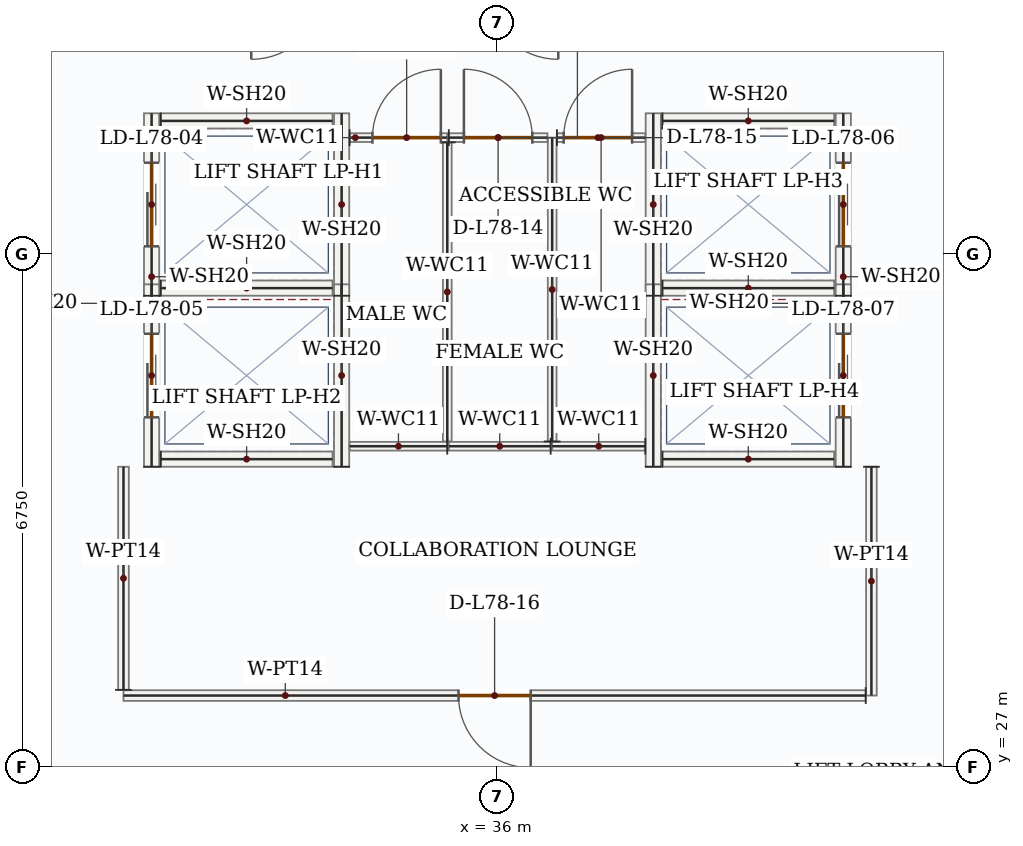
"""IFC4 building model, lengths in metres.
Left out: names, types, materials, properties, quantities, classifications, styles, units other than length and angle.
Written with IfcOpenShell. Run it as: python <this file> out.ifc"""

import sys

from ifc_helpers import new_model, si_unit, direction, frame, frame_2d, origin, place, context, subcontext, project, spatial, rectangle, extrude, source, transform, mapped, element, fill, save


model = new_model("IFC4")
c1 = context("Model", 3, precision=1e-05, world=origin(), true_north=direction((0.0, 1.0)))
c2 = subcontext(c1, "Body", "Model", "MODEL_VIEW")
j1 = project(units=[si_unit("LENGTHUNIT", "METRE"), si_unit("PLANEANGLEUNIT", "RADIAN")], contexts=[c1])
p1 = place(None, origin())
s1 = spatial("IfcSite", under=j1, at=p1, CompositionType="ELEMENT")
p2 = place(p1, origin())
s2 = spatial("IfcBuilding", under=s1, at=p2, CompositionType="ELEMENT")
p3 = place(p2, frame((0.0, 0.0, 323.55)))
s3 = spatial("IfcBuildingStorey", under=s2, at=p3, CompositionType="ELEMENT", Elevation=323.55)
p4 = place(p3, frame((31.45, 33.2, 0.0), z_axis=(0.0, 0.0, 1.0), x_axis=(0.0, 1.0, 0.0)))
e1 = element("IfcWall", 1, at=p4, inside=s3, PredefinedType="SOLIDWALL", context=c2, shape_type="SweptSolid", body=[
    extrude(rectangle(XDim=2.4, YDim=0.2, at=frame_2d((1.2, 0.0))), origin(), (0.0, 0.0, 1.0), 3.5),
])
p5 = place(p4, frame((0.65, 0.0, 0.0)))
e2 = element("IfcOpeningElement", 2, at=p5, cuts=e1, PredefinedType="OPENING", context=c2, shape_type="SweptSolid", body=[
    extrude(rectangle(XDim=1.1, YDim=2.15, at=frame_2d((0.55, 1.075))), frame((0.0, 0.11, 0.0), z_axis=(0.0, -1.0, 0.0), x_axis=(1.0, 0.0, 0.0)), (0.0, 0.0, 1.0), 0.22),
])
m1 = source(origin(), c2, "Body", "SweptSolid", [
    extrude(rectangle(XDim=2.4, YDim=0.2, at=frame_2d((1.2, 0.0))), origin(), (0.0, 0.0, 1.0), 3.5),
])
p6 = place(p3, frame((33.95, 33.2, 0.0), z_axis=(0.0, 0.0, 1.0), x_axis=(0.0, 1.0, 0.0)))
e3 = element("IfcWall", 3, at=p6, inside=s3, PredefinedType="SOLIDWALL", context=c2, shape_type="MappedRepresentation", body=[
    mapped(m1, transform((0.0, 0.0, 0.0), x_axis=(1.0, 0.0, 0.0), y_axis=(0.0, 1.0, 0.0), z_axis=(0.0, 0.0, 1.0), scale=1.0)),
])
m2 = source(origin(), c2, "Body", "SweptSolid", [
    extrude(rectangle(XDim=2.26, YDim=0.2, at=frame_2d((1.13, 0.0))), origin(), (0.0, 0.0, 1.0), 3.5),
])
for number, where, z_axis, x_axis in (
    (4, (31.57, 33.3, 0.0), (0.0, 0.0, 1.0), (1.0, 0.0, 0.0)),
    (5, (31.57, 35.5, 0.0), (0.0, 0.0, 1.0), (1.0, 0.0, 0.0)),
):
    element("IfcWall", number, at=place(p3, frame(where, z_axis=z_axis, x_axis=x_axis)), inside=s3, PredefinedType="SOLIDWALL", context=c2, shape_type="MappedRepresentation", body=[
        mapped(m2, transform((0.0, 0.0, 0.0), x_axis=(1.0, 0.0, 0.0), y_axis=(0.0, 1.0, 0.0), z_axis=(0.0, 0.0, 1.0), scale=1.0)),
    ])
p7 = place(p3, frame((31.45, 30.95, 0.0), z_axis=(0.0, 0.0, 1.0), x_axis=(0.0, 1.0, 0.0)))
e6 = element("IfcWall", 6, at=p7, inside=s3, PredefinedType="SOLIDWALL", context=c2, shape_type="SweptSolid", body=[
    extrude(rectangle(XDim=2.4, YDim=0.2, at=frame_2d((1.2, 0.0))), origin(), (0.0, 0.0, 1.0), 3.5),
])
p8 = place(p7, frame((0.65, 0.0, 0.0)))
e7 = element("IfcOpeningElement", 7, at=p8, cuts=e6, PredefinedType="OPENING", context=c2, shape_type="SweptSolid", body=[
    extrude(rectangle(XDim=1.1, YDim=2.15, at=frame_2d((0.55, 1.075))), frame((0.0, 0.11, 0.0), z_axis=(0.0, -1.0, 0.0), x_axis=(1.0, 0.0, 0.0)), (0.0, 0.0, 1.0), 0.22),
])
p9 = place(p3, frame((33.95, 30.95, 0.0), z_axis=(0.0, 0.0, 1.0), x_axis=(0.0, 1.0, 0.0)))
e8 = element("IfcWall", 8, at=p9, inside=s3, PredefinedType="SOLIDWALL", context=c2, shape_type="MappedRepresentation", body=[
    mapped(m1, transform((0.0, 0.0, 0.0), x_axis=(1.0, 0.0, 0.0), y_axis=(0.0, 1.0, 0.0), z_axis=(0.0, 0.0, 1.0), scale=1.0)),
])
p10 = place(p3, frame((31.57, 31.05, 0.0), z_axis=(0.0, 0.0, 1.0), x_axis=(1.0, 0.0, 0.0)))
e9 = element("IfcWall", 9, at=p10, inside=s3, PredefinedType="SOLIDWALL", context=c2, shape_type="MappedRepresentation", body=[
    mapped(m2, transform((0.0, 0.0, 0.0), x_axis=(1.0, 0.0, 0.0), y_axis=(0.0, 1.0, 0.0), z_axis=(0.0, 0.0, 1.0), scale=1.0)),
])
p11 = place(p3, frame((38.05, 33.2, 0.0), z_axis=(0.0, 0.0, 1.0), x_axis=(0.0, 1.0, 0.0)))
e10 = element("IfcWall", 10, at=p11, inside=s3, PredefinedType="SOLIDWALL", context=c2, shape_type="MappedRepresentation", body=[
    mapped(m1, transform((0.0, 0.0, 0.0), x_axis=(1.0, 0.0, 0.0), y_axis=(0.0, 1.0, 0.0), z_axis=(0.0, 0.0, 1.0), scale=1.0)),
])
p12 = place(p3, frame((40.55, 33.2, 0.0), z_axis=(0.0, 0.0, 1.0), x_axis=(0.0, 1.0, 0.0)))
e11 = element("IfcWall", 11, at=p12, inside=s3, PredefinedType="SOLIDWALL", context=c2, shape_type="SweptSolid", body=[
    extrude(rectangle(XDim=2.4, YDim=0.2, at=frame_2d((1.2, 0.0))), origin(), (0.0, 0.0, 1.0), 3.5),
])
p13 = place(p12, frame((0.65, 0.0, 0.0)))
e12 = element("IfcOpeningElement", 12, at=p13, cuts=e11, PredefinedType="OPENING", context=c2, shape_type="SweptSolid", body=[
    extrude(rectangle(XDim=1.1, YDim=2.15, at=frame_2d((0.55, 1.075))), frame((0.0, 0.11, 0.0), z_axis=(0.0, -1.0, 0.0), x_axis=(1.0, 0.0, 0.0)), (0.0, 0.0, 1.0), 0.22),
])
for number, where, z_axis, x_axis in (
    (13, (38.17, 33.3, 0.0), (0.0, 0.0, 1.0), (1.0, 0.0, 0.0)),
    (14, (38.17, 35.5, 0.0), (0.0, 0.0, 1.0), (1.0, 0.0, 0.0)),
):
    element("IfcWall", number, at=place(p3, frame(where, z_axis=z_axis, x_axis=x_axis)), inside=s3, PredefinedType="SOLIDWALL", context=c2, shape_type="MappedRepresentation", body=[
        mapped(m2, transform((0.0, 0.0, 0.0), x_axis=(1.0, 0.0, 0.0), y_axis=(0.0, 1.0, 0.0), z_axis=(0.0, 0.0, 1.0), scale=1.0)),
    ])
p14 = place(p3, frame((38.05, 30.95, 0.0), z_axis=(0.0, 0.0, 1.0), x_axis=(0.0, 1.0, 0.0)))
e15 = element("IfcWall", 15, at=p14, inside=s3, PredefinedType="SOLIDWALL", context=c2, shape_type="MappedRepresentation", body=[
    mapped(m1, transform((0.0, 0.0, 0.0), x_axis=(1.0, 0.0, 0.0), y_axis=(0.0, 1.0, 0.0), z_axis=(0.0, 0.0, 1.0), scale=1.0)),
])
p15 = place(p3, frame((40.55, 30.95, 0.0), z_axis=(0.0, 0.0, 1.0), x_axis=(0.0, 1.0, 0.0)))
e16 = element("IfcWall", 16, at=p15, inside=s3, PredefinedType="SOLIDWALL", context=c2, shape_type="SweptSolid", body=[
    extrude(rectangle(XDim=2.4, YDim=0.2, at=frame_2d((1.2, 0.0))), origin(), (0.0, 0.0, 1.0), 3.5),
])
p16 = place(p15, frame((0.65, 0.0, 0.0)))
e17 = element("IfcOpeningElement", 17, at=p16, cuts=e16, PredefinedType="OPENING", context=c2, shape_type="SweptSolid", body=[
    extrude(rectangle(XDim=1.1, YDim=2.15, at=frame_2d((0.55, 1.075))), frame((0.0, 0.11, 0.0), z_axis=(0.0, -1.0, 0.0), x_axis=(1.0, 0.0, 0.0)), (0.0, 0.0, 1.0), 0.22),
])
p17 = place(p3, frame((38.17, 31.05, 0.0), z_axis=(0.0, 0.0, 1.0), x_axis=(1.0, 0.0, 0.0)))
e18 = element("IfcWall", 18, at=p17, inside=s3, PredefinedType="SOLIDWALL", context=c2, shape_type="MappedRepresentation", body=[
    mapped(m2, transform((0.0, 0.0, 0.0), x_axis=(1.0, 0.0, 0.0), y_axis=(0.0, 1.0, 0.0), z_axis=(0.0, 0.0, 1.0), scale=1.0)),
])
m3 = source(origin(), c2, "Body", "SweptSolid", [
    extrude(rectangle(XDim=1.225, YDim=0.115, at=frame_2d((0.613, 0.0))), origin(), (0.0, 0.0, 1.0), 3.5),
])
p18 = place(p3, frame((37.945, 31.22, 0.0), z_axis=(0.0, 0.0, 1.0), x_axis=(-1.0, 0.0, 0.0)))
e19 = element("IfcWall", 19, at=p18, inside=s3, PredefinedType="PARTITIONING", context=c2, shape_type="MappedRepresentation", body=[
    mapped(m3, transform((0.0, 0.0, 0.0), x_axis=(1.0, 0.0, 0.0), y_axis=(0.0, 1.0, 0.0), z_axis=(0.0, 0.0, 1.0), scale=1.0)),
])
m4 = source(origin(), c2, "Body", "SweptSolid", [
    extrude(rectangle(XDim=3.998, YDim=0.115, at=frame_2d((1.999, 0.0))), origin(), (0.0, 0.0, 1.0), 3.5),
])
p19 = place(p3, frame((36.72, 31.282, 0.0), z_axis=(0.0, 0.0, 1.0), x_axis=(0.0, 1.0, 0.0)))
e20 = element("IfcWall", 20, at=p19, inside=s3, PredefinedType="PARTITIONING", context=c2, shape_type="MappedRepresentation", body=[
    mapped(m4, transform((0.0, 0.0, 0.0), x_axis=(1.0, 0.0, 0.0), y_axis=(0.0, 1.0, 0.0), z_axis=(0.0, 0.0, 1.0), scale=1.0)),
])
p20 = place(p3, frame((36.782, 35.28, 0.0), z_axis=(0.0, 0.0, 1.0), x_axis=(1.0, 0.0, 0.0)))
e21 = element("IfcWall", 21, at=p20, inside=s3, PredefinedType="PARTITIONING", context=c2, shape_type="SweptSolid", body=[
    extrude(rectangle(XDim=1.163, YDim=0.115, at=frame_2d((0.581, 0.0))), origin(), (0.0, 0.0, 1.0), 3.5),
])
p21 = place(p20, frame((0.089, 0.0, 0.0)))
e22 = element("IfcOpeningElement", 22, at=p21, cuts=e21, PredefinedType="OPENING", context=c2, shape_type="SweptSolid", body=[
    extrude(rectangle(XDim=0.9, YDim=2.1, at=frame_2d((0.45, 1.05))), frame((0.0, 0.067, 0.0), z_axis=(0.0, -1.0, 0.0), x_axis=(1.0, 0.0, 0.0)), (0.0, 0.0, 1.0), 0.135),
])
m5 = source(origin(), c2, "Body", "SweptSolid", [
    extrude(rectangle(XDim=1.285, YDim=0.115, at=frame_2d((0.643, 0.0))), origin(), (0.0, 0.0, 1.0), 3.5),
])
p22 = place(p3, frame((35.34, 31.22, 0.0), z_axis=(0.0, 0.0, 1.0), x_axis=(-1.0, 0.0, 0.0)))
e23 = element("IfcWall", 23, at=p22, inside=s3, PredefinedType="PARTITIONING", context=c2, shape_type="MappedRepresentation", body=[
    mapped(m5, transform((0.0, 0.0, 0.0), x_axis=(1.0, 0.0, 0.0), y_axis=(0.0, 1.0, 0.0), z_axis=(0.0, 0.0, 1.0), scale=1.0)),
])
p23 = place(p3, frame((34.055, 35.28, 0.0), z_axis=(0.0, 0.0, 1.0), x_axis=(1.0, 0.0, 0.0)))
e24 = element("IfcWall", 24, at=p23, inside=s3, PredefinedType="PARTITIONING", context=c2, shape_type="SweptSolid", body=[
    extrude(rectangle(XDim=1.285, YDim=0.115, at=frame_2d((0.643, 0.0))), origin(), (0.0, 0.0, 1.0), 3.5),
])
p24 = place(p23, frame((0.3, 0.0, 0.0)))
e25 = element("IfcOpeningElement", 25, at=p24, cuts=e24, PredefinedType="OPENING", context=c2, shape_type="SweptSolid", body=[
    extrude(rectangle(XDim=0.9, YDim=2.1, at=frame_2d((0.45, 1.05))), frame((0.0, 0.067, 0.0), z_axis=(0.0, -1.0, 0.0), x_axis=(1.0, 0.0, 0.0)), (0.0, 0.0, 1.0), 0.135),
])
m6 = source(origin(), c2, "Body", "SweptSolid", [
    extrude(rectangle(XDim=3.935, YDim=0.115, at=frame_2d((1.968, 0.0))), origin(), (0.0, 0.0, 1.0), 3.5),
])
p25 = place(p3, frame((35.34, 35.218, 0.0), z_axis=(0.0, 0.0, 1.0), x_axis=(0.0, -1.0, 0.0)))
e26 = element("IfcWall", 26, at=p25, inside=s3, PredefinedType="PARTITIONING", context=c2, shape_type="MappedRepresentation", body=[
    mapped(m6, transform((0.0, 0.0, 0.0), x_axis=(1.0, 0.0, 0.0), y_axis=(0.0, 1.0, 0.0), z_axis=(0.0, 0.0, 1.0), scale=1.0)),
])
m7 = source(origin(), c2, "Body", "SweptSolid", [
    extrude(rectangle(XDim=1.34, YDim=0.115, at=frame_2d((0.67, 0.0))), origin(), (0.0, 0.0, 1.0), 3.5),
])
p26 = place(p3, frame((36.7, 31.22, 0.0), z_axis=(0.0, 0.0, 1.0), x_axis=(-1.0, 0.0, 0.0)))
e27 = element("IfcWall", 27, at=p26, inside=s3, PredefinedType="PARTITIONING", context=c2, shape_type="MappedRepresentation", body=[
    mapped(m7, transform((0.0, 0.0, 0.0), x_axis=(1.0, 0.0, 0.0), y_axis=(0.0, 1.0, 0.0), z_axis=(0.0, 0.0, 1.0), scale=1.0)),
])
p27 = place(p3, frame((35.36, 35.28, 0.0), z_axis=(0.0, 0.0, 1.0), x_axis=(1.0, 0.0, 0.0)))
e28 = element("IfcWall", 28, at=p27, inside=s3, PredefinedType="PARTITIONING", context=c2, shape_type="SweptSolid", body=[
    extrude(rectangle(XDim=1.297, YDim=0.115, at=frame_2d((0.649, 0.0))), origin(), (0.0, 0.0, 1.0), 3.5),
])
p28 = place(p27, frame((0.199, 0.0, 0.0)))
e29 = element("IfcOpeningElement", 29, at=p28, cuts=e28, PredefinedType="OPENING", context=c2, shape_type="SweptSolid", body=[
    extrude(rectangle(XDim=0.9, YDim=2.1, at=frame_2d((0.45, 1.05))), frame((0.0, 0.067, 0.0), z_axis=(0.0, -1.0, 0.0), x_axis=(1.0, 0.0, 0.0)), (0.0, 0.0, 1.0), 0.135),
])
m8 = source(origin(), c2, "Body", "SweptSolid", [
    extrude(rectangle(XDim=3.01, YDim=0.14, at=frame_2d((1.505, 0.0))), origin(), (0.0, 0.0, 1.0), 3.5),
])
p29 = place(p3, frame((40.92, 30.95, 0.0), z_axis=(0.0, 0.0, 1.0), x_axis=(0.0, -1.0, 0.0)))
e30 = element("IfcWall", 30, at=p29, inside=s3, PredefinedType="PARTITIONING", context=c2, shape_type="MappedRepresentation", body=[
    mapped(m8, transform((0.0, 0.0, 0.0), x_axis=(1.0, 0.0, 0.0), y_axis=(0.0, 1.0, 0.0), z_axis=(0.0, 0.0, 1.0), scale=1.0)),
])
p30 = place(p3, frame((40.845, 27.94, 0.0), z_axis=(0.0, 0.0, 1.0), x_axis=(-1.0, 0.0, 0.0)))
e31 = element("IfcWall", 31, at=p30, inside=s3, PredefinedType="PARTITIONING", context=c2, shape_type="SweptSolid", body=[
    extrude(rectangle(XDim=9.765, YDim=0.14, at=frame_2d((4.882, 0.0))), origin(), (0.0, 0.0, 1.0), 3.5),
])
p31 = place(p30, frame((4.407, 0.0, 0.0)))
e32 = element("IfcOpeningElement", 32, at=p31, cuts=e31, PredefinedType="OPENING", context=c2, shape_type="SweptSolid", body=[
    extrude(rectangle(XDim=0.95, YDim=2.15, at=frame_2d((0.475, 1.075))), frame((0.0, 0.08, 0.0), z_axis=(0.0, -1.0, 0.0), x_axis=(1.0, 0.0, 0.0)), (0.0, 0.0, 1.0), 0.16),
])
m9 = source(origin(), c2, "Body", "SweptSolid", [
    extrude(rectangle(XDim=2.935, YDim=0.14, at=frame_2d((1.468, 0.0))), origin(), (0.0, 0.0, 1.0), 3.5),
])
p32 = place(p3, frame((31.08, 28.015, 0.0), z_axis=(0.0, 0.0, 1.0), x_axis=(0.0, 1.0, 0.0)))
e33 = element("IfcWall", 33, at=p32, inside=s3, PredefinedType="PARTITIONING", context=c2, shape_type="MappedRepresentation", body=[
    mapped(m9, transform((0.0, 0.0, 0.0), x_axis=(1.0, 0.0, 0.0), y_axis=(0.0, 1.0, 0.0), z_axis=(0.0, 0.0, 1.0), scale=1.0)),
])
m10 = source(origin(), c2, "Body", "SweptSolid", [
    extrude(rectangle(XDim=1.1, YDim=2.15, at=frame_2d((0.55, 1.075))), frame((0.0, 0.025, 0.0), z_axis=(0.0, -1.0, 0.0), x_axis=(1.0, 0.0, 0.0)), (0.0, 0.0, 1.0), 0.05),
])
p33 = place(p5, origin())
e34 = element("IfcDoor", 34, at=p33, inside=s3, OperationType="DOUBLE_DOOR_SLIDING", PredefinedType="DOOR", context=c2, shape_type="MappedRepresentation", body=[
    mapped(m10, transform((0.0, 0.0, 0.0), x_axis=(1.0, 0.0, 0.0), y_axis=(0.0, 1.0, 0.0), z_axis=(0.0, 0.0, 1.0), scale=1.0)),
])
fill(e2, e34)
p34 = place(p8, origin())
e35 = element("IfcDoor", 35, at=p34, inside=s3, OperationType="DOUBLE_DOOR_SLIDING", PredefinedType="DOOR", context=c2, shape_type="MappedRepresentation", body=[
    mapped(m10, transform((0.0, 0.0, 0.0), x_axis=(1.0, 0.0, 0.0), y_axis=(0.0, 1.0, 0.0), z_axis=(0.0, 0.0, 1.0), scale=1.0)),
])
fill(e7, e35)
p35 = place(p13, origin())
e36 = element("IfcDoor", 36, at=p35, inside=s3, OperationType="DOUBLE_DOOR_SLIDING", PredefinedType="DOOR", context=c2, shape_type="MappedRepresentation", body=[
    mapped(m10, transform((0.0, 0.0, 0.0), x_axis=(1.0, 0.0, 0.0), y_axis=(0.0, 1.0, 0.0), z_axis=(0.0, 0.0, 1.0), scale=1.0)),
])
fill(e12, e36)
p36 = place(p16, origin())
e37 = element("IfcDoor", 37, at=p36, inside=s3, OperationType="DOUBLE_DOOR_SLIDING", PredefinedType="DOOR", context=c2, shape_type="MappedRepresentation", body=[
    mapped(m10, transform((0.0, 0.0, 0.0), x_axis=(1.0, 0.0, 0.0), y_axis=(0.0, 1.0, 0.0), z_axis=(0.0, 0.0, 1.0), scale=1.0)),
])
fill(e17, e37)
m11 = source(origin(), c2, "Body", "SweptSolid", [
    extrude(rectangle(XDim=0.9, YDim=2.1, at=frame_2d((0.45, 1.05))), frame((0.0, 0.025, 0.0), z_axis=(0.0, -1.0, 0.0), x_axis=(1.0, 0.0, 0.0)), (0.0, 0.0, 1.0), 0.05),
])
p37 = place(p24, origin())
e38 = element("IfcDoor", 38, at=p37, inside=s3, OperationType="SINGLE_SWING_RIGHT", PredefinedType="DOOR", context=c2, shape_type="MappedRepresentation", body=[
    mapped(m11, transform((0.0, 0.0, 0.0), x_axis=(1.0, 0.0, 0.0), y_axis=(0.0, 1.0, 0.0), z_axis=(0.0, 0.0, 1.0), scale=1.0)),
])
fill(e25, e38)
p38 = place(p28, origin())
e39 = element("IfcDoor", 39, at=p38, inside=s3, OperationType="SINGLE_SWING_LEFT", PredefinedType="DOOR", context=c2, shape_type="MappedRepresentation", body=[
    mapped(m11, transform((0.0, 0.0, 0.0), x_axis=(1.0, 0.0, 0.0), y_axis=(0.0, 1.0, 0.0), z_axis=(0.0, 0.0, 1.0), scale=1.0)),
])
fill(e29, e39)
p39 = place(p21, origin())
e40 = element("IfcDoor", 40, at=p39, inside=s3, OperationType="SINGLE_SWING_RIGHT", PredefinedType="DOOR", context=c2, shape_type="MappedRepresentation", body=[
    mapped(m11, transform((0.0, 0.0, 0.0), x_axis=(1.0, 0.0, 0.0), y_axis=(0.0, 1.0, 0.0), z_axis=(0.0, 0.0, 1.0), scale=1.0)),
])
fill(e22, e40)
m12 = source(origin(), c2, "Body", "SweptSolid", [
    extrude(rectangle(XDim=0.95, YDim=2.15, at=frame_2d((0.475, 1.075))), frame((0.0, 0.025, 0.0), z_axis=(0.0, -1.0, 0.0), x_axis=(1.0, 0.0, 0.0)), (0.0, 0.0, 1.0), 0.05),
])
p40 = place(p31, origin())
e41 = element("IfcDoor", 41, at=p40, inside=s3, OperationType="SINGLE_SWING_LEFT", PredefinedType="DOOR", context=c2, shape_type="MappedRepresentation", body=[
    mapped(m12, transform((0.0, 0.0, 0.0), x_axis=(1.0, 0.0, 0.0), y_axis=(0.0, 1.0, 0.0), z_axis=(0.0, 0.0, 1.0), scale=1.0)),
])
fill(e32, e41)
save(model, sys.argv[1])
